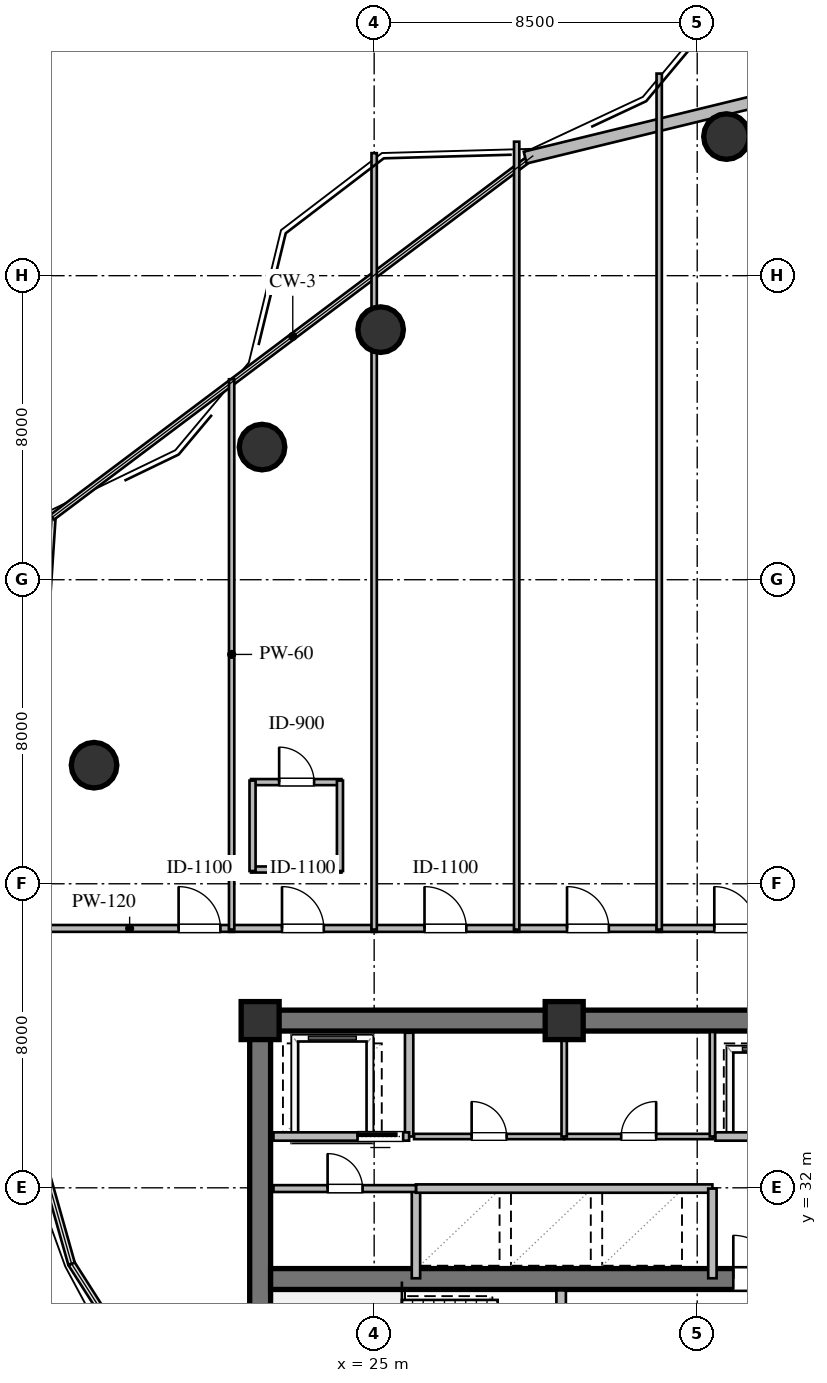
"""IFC4 building model, lengths in metres.
Left out: names, types, materials, properties, quantities, classifications, styles, units other than length and angle.
Written with IfcOpenShell. Run it as: python <this file> out.ifc"""

import sys

from ifc_helpers import new_model, si_unit, direction, frame, frame_2d, origin, origin_2d, place, context, subcontext, project, spatial, rectangle, circle, extrude, element, fill, save


model = new_model("IFC4")
c1 = context("Model", 3, precision=1e-05, world=origin(), true_north=direction((0.0, 1.0)))
c2 = subcontext(c1, "Body", "Model", "MODEL_VIEW")
j1 = project(units=[si_unit("LENGTHUNIT", "METRE"), si_unit("PLANEANGLEUNIT", "RADIAN")], contexts=[c1])
p1 = place(None, origin())
s1 = spatial("IfcSite", under=j1, at=p1, CompositionType="ELEMENT")
p2 = place(p1, origin())
s2 = spatial("IfcBuilding", under=s1, at=p2, CompositionType="ELEMENT")
p3 = place(p2, frame((0.0, 0.0, 117.0)))
s3 = spatial("IfcBuildingStorey", under=s2, at=p3, CompositionType="ELEMENT", Elevation=117.0)
p4 = place(p3, frame((21.725, 36.4, 0.0), z_axis=(0.0, 0.0, 1.0), x_axis=(1.0, 0.0, 0.0)))
e1 = element("IfcWall", 1, at=p4, inside=s3, PredefinedType="SHEAR", context=c2, shape_type="SweptSolid", body=[
    extrude(rectangle(XDim=22.55, YDim=0.55, at=frame_2d((11.275, 0.0))), origin(), (0.0, 0.0, 1.0), 3.36),
])
p5 = place(p3, frame((22.0, 23.875, 0.0), z_axis=(0.0, 0.0, 1.0), x_axis=(0.0, 1.0, 0.0)))
e2 = element("IfcWall", 2, at=p5, inside=s3, PredefinedType="SHEAR", context=c2, shape_type="SweptSolid", body=[
    extrude(rectangle(XDim=12.25, YDim=0.55, at=frame_2d((6.125, 0.0))), origin(), (0.0, 0.0, 1.0), 3.36),
])
p6 = place(p3, frame((22.275, 29.6, 0.0), z_axis=(0.0, 0.0, 1.0), x_axis=(1.0, 0.0, 0.0)))
e3 = element("IfcWall", 3, at=p6, inside=s3, PredefinedType="SHEAR", context=c2, shape_type="SweptSolid", body=[
    extrude(rectangle(XDim=21.45, YDim=0.55, at=frame_2d((10.725, 0.0))), origin(), (0.0, 0.0, 1.0), 3.36),
])
p7 = place(p6, frame((12.175, 0.0, 0.0)))
e4 = element("IfcOpeningElement", 4, at=p7, cuts=e3, PredefinedType="OPENING", context=c2, shape_type="SweptSolid", body=[
    extrude(rectangle(XDim=1.15, YDim=2.1, at=frame_2d((0.575, 1.05))), frame((0.0, 0.285, 0.0), z_axis=(0.0, -1.0, 0.0), x_axis=(1.0, 0.0, 0.0)), (0.0, 0.0, 1.0), 0.57),
])
for number, where, z_axis, x_axis in (
    (5, (30.0, 36.4, 0.0), (0.0, 0.0, 1.0), (1.0, 0.0, 0.0)),
    (6, (22.0, 36.4, 0.0), (0.0, 0.0, 1.0), (1.0, 0.0, 0.0)),
):
    element("IfcColumn", number, at=place(p3, frame(where, z_axis=z_axis, x_axis=x_axis)), inside=s3, PredefinedType="COLUMN", context=c2, shape_type="SweptSolid", body=[
        extrude(rectangle(XDim=1.0, YDim=1.0, at=origin_2d()), origin(), (0.0, 0.0, 1.0), 3.6),
    ])
for number, where, z_axis, x_axis in (
    (7, (34.27, 59.66, 0.0), (0.0, 0.0, 1.0), (1.0, 0.0, 0.0)),
    (8, (25.17, 54.58, 0.0), (0.0, 0.0, 1.0), (1.0, 0.0, 0.0)),
    (9, (22.05, 51.49, 0.0), (0.0, 0.0, 1.0), (1.0, 0.0, 0.0)),
    (10, (17.63, 43.12, 0.0), (0.0, 0.0, 1.0), (1.0, 0.0, 0.0)),
):
    element("IfcColumn", number, at=place(p3, frame(where, z_axis=z_axis, x_axis=x_axis)), inside=s3, PredefinedType="COLUMN", context=c2, shape_type="SweptSolid", body=[
        extrude(circle(Radius=0.6, at=origin_2d()), origin(), (0.0, 0.0, 1.0), 3.6),
    ])
p8 = place(p3, frame((28.974, 59.107, 0.0), z_axis=(0.0, 0.0, 1.0), x_axis=(0.971593971582, 0.236654081699, 0.0)))
e11 = element("IfcWall", 11, at=p8, inside=s3, PredefinedType="STANDARD", context=c2, shape_type="SweptSolid", body=[
    extrude(rectangle(XDim=16.763, YDim=0.32, at=frame_2d((8.381, 0.0))), origin(), (0.0, 0.0, 1.0), 3.36),
])
p9 = place(p8, frame((8.021, 0.0, 1.05)))
e12 = element("IfcOpeningElement", 12, at=p9, cuts=e11, PredefinedType="OPENING", context=c2, shape_type="SweptSolid", body=[
    extrude(rectangle(XDim=1.6, YDim=1.5, at=frame_2d((0.8, 0.75))), frame((0.0, 0.17, 0.0), z_axis=(0.0, -1.0, 0.0), x_axis=(1.0, 0.0, 0.0)), (0.0, 0.0, 1.0), 0.34),
])
p10 = place(p3, frame((29.92, 23.9, 0.0), z_axis=(0.0, 0.0, 1.0), x_axis=(0.0, 1.0, 0.0)))
e13 = element("IfcWall", 13, at=p10, inside=s3, PredefinedType="SOLIDWALL", context=c2, shape_type="SweptSolid", body=[
    extrude(rectangle(XDim=5.4, YDim=0.25, at=frame_2d((2.7, 0.0))), origin(), (0.0, 0.0, 1.0), 2.806),
])
p11 = place(p10, frame((3.421, 0.0, 0.0)))
e14 = element("IfcOpeningElement", 14, at=p11, cuts=e13, PredefinedType="OPENING", context=c2, shape_type="SweptSolid", body=[
    extrude(rectangle(XDim=1.15, YDim=2.1, at=frame_2d((0.575, 1.05))), frame((0.0, 0.135, 0.0), z_axis=(0.0, -1.0, 0.0), x_axis=(1.0, 0.0, 0.0)), (0.0, 0.0, 1.0), 0.27),
])
p12 = place(p3, frame((25.92, 33.35, 0.0), z_axis=(0.0, 0.0, 1.0), x_axis=(0.0, 1.0, 0.0)))
e15 = element("IfcWall", 15, at=p12, inside=s3, PredefinedType="SOLIDWALL", context=c2, shape_type="SweptSolid", body=[
    extrude(rectangle(XDim=2.73, YDim=0.22, at=frame_2d((1.365, 0.0))), origin(), (0.0, 0.0, 1.0), 3.36),
])
p13 = place(p3, frame((22.35, 33.35, 0.0), z_axis=(0.0, 0.0, 1.0), x_axis=(1.0, 0.0, 0.0)))
e16 = element("IfcWall", 16, at=p13, inside=s3, PredefinedType="SOLIDWALL", context=c2, shape_type="SweptSolid", body=[
    extrude(rectangle(XDim=3.57, YDim=0.22, at=frame_2d((1.785, 0.0))), origin(), (0.0, 0.0, 1.0), 3.36),
])
p14 = place(p13, frame((2.213, 0.0, 0.0)))
e17 = element("IfcOpeningElement", 17, at=p14, cuts=e16, PredefinedType="OPENING", context=c2, shape_type="SweptSolid", body=[
    extrude(rectangle(XDim=1.2, YDim=2.1, at=frame_2d((0.6, 1.05))), frame((0.0, 0.12, 0.0), z_axis=(0.0, -1.0, 0.0), x_axis=(1.0, 0.0, 0.0)), (0.0, 0.0, 1.0), 0.24),
])
p15 = place(p3, frame((26.1, 29.62, 0.0), z_axis=(0.0, 0.0, 1.0), x_axis=(0.0, 1.0, 0.0)))
e18 = element("IfcWall", 18, at=p15, inside=s3, PredefinedType="SOLIDWALL", context=c2, shape_type="SweptSolid", body=[
    extrude(rectangle(XDim=2.36, YDim=0.22, at=frame_2d((1.18, 0.0))), origin(), (0.0, 0.0, 1.0), 3.36),
])
p16 = place(p3, frame((26.1, 31.98, 0.0), z_axis=(0.0, 0.0, 1.0), x_axis=(1.0, 0.0, 0.0)))
e19 = element("IfcWall", 19, at=p16, inside=s3, PredefinedType="SOLIDWALL", context=c2, shape_type="SweptSolid", body=[
    extrude(rectangle(XDim=7.8, YDim=0.22, at=frame_2d((3.9, 0.0))), origin(), (0.0, 0.0, 1.0), 3.36),
])
p17 = place(p3, frame((33.9, 29.62, 0.0), z_axis=(0.0, 0.0, 1.0), x_axis=(0.0, 1.0, 0.0)))
e20 = element("IfcWall", 20, at=p17, inside=s3, PredefinedType="SOLIDWALL", context=c2, shape_type="SweptSolid", body=[
    extrude(rectangle(XDim=2.36, YDim=0.22, at=frame_2d((1.18, 0.0))), origin(), (0.0, 0.0, 1.0), 3.36),
])
p18 = place(p3, frame((26.05, 33.35, 0.0), z_axis=(0.0, 0.0, 1.0), x_axis=(1.0, 0.0, 0.0)))
e21 = element("IfcWall", 21, at=p18, inside=s3, PredefinedType="PARTITIONING", context=c2, shape_type="SweptSolid", body=[
    extrude(rectangle(XDim=3.95, YDim=0.14, at=frame_2d((1.975, 0.0))), origin(), (0.0, 0.0, 1.0), 3.36),
])
p19 = place(p18, frame((1.515, 0.0, 0.0)))
e22 = element("IfcOpeningElement", 22, at=p19, cuts=e21, PredefinedType="OPENING", context=c2, shape_type="SweptSolid", body=[
    extrude(rectangle(XDim=0.92, YDim=2.1, at=frame_2d((0.46, 1.05))), frame((0.0, 0.08, 0.0), z_axis=(0.0, -1.0, 0.0), x_axis=(1.0, 0.0, 0.0)), (0.0, 0.0, 1.0), 0.16),
])
p20 = place(p3, frame((30.0, 33.35, 0.0), z_axis=(0.0, 0.0, 1.0), x_axis=(1.0, 0.0, 0.0)))
e23 = element("IfcWall", 23, at=p20, inside=s3, PredefinedType="PARTITIONING", context=c2, shape_type="SweptSolid", body=[
    extrude(rectangle(XDim=3.92, YDim=0.14, at=frame_2d((1.96, 0.0))), origin(), (0.0, 0.0, 1.0), 3.36),
])
p21 = place(p20, frame((1.5, 0.0, 0.0)))
e24 = element("IfcOpeningElement", 24, at=p21, cuts=e23, PredefinedType="OPENING", context=c2, shape_type="SweptSolid", body=[
    extrude(rectangle(XDim=0.92, YDim=2.1, at=frame_2d((0.46, 1.05))), frame((0.0, 0.08, 0.0), z_axis=(0.0, -1.0, 0.0), x_axis=(1.0, 0.0, 0.0)), (0.0, 0.0, 1.0), 0.16),
])
for number, where, z_axis, x_axis in (
    (25, (30.0, 33.35, 0.0), (0.0, 0.0, 1.0), (0.0, 1.0, 0.0)),
    (26, (33.9, 33.35, 0.0), (0.0, 0.0, 1.0), (0.0, 1.0, 0.0)),
):
    element("IfcWall", number, at=place(p3, frame(where, z_axis=z_axis, x_axis=x_axis)), inside=s3, PredefinedType="PARTITIONING", context=c2, shape_type="SweptSolid", body=[
        extrude(rectangle(XDim=2.75, YDim=0.14, at=frame_2d((1.375, 0.0))), origin(), (0.0, 0.0, 1.0), 3.36),
    ])
p22 = place(p3, frame((33.98, 33.35, 0.0), z_axis=(0.0, 0.0, 1.0), x_axis=(1.0, 0.0, 0.0)))
e27 = element("IfcWall", 27, at=p22, inside=s3, PredefinedType="SOLIDWALL", context=c2, shape_type="SweptSolid", body=[
    extrude(rectangle(XDim=7.54, YDim=0.22, at=frame_2d((3.77, 0.0))), origin(), (0.0, 0.0, 1.0), 3.36),
])
p23 = place(p22, frame((1.335, 0.0, 0.0)))
e28 = element("IfcOpeningElement", 28, at=p23, cuts=e27, PredefinedType="OPENING", context=c2, shape_type="SweptSolid", body=[
    extrude(rectangle(XDim=1.1, YDim=2.1, at=frame_2d((0.55, 1.05))), frame((0.0, 0.12, 0.0), z_axis=(0.0, -1.0, 0.0), x_axis=(1.0, 0.0, 0.0)), (0.0, 0.0, 1.0), 0.24),
])
p24 = place(p22, frame((4.879, 0.0, 0.0)))
e29 = element("IfcOpeningElement", 29, at=p24, cuts=e27, PredefinedType="OPENING", context=c2, shape_type="SweptSolid", body=[
    extrude(rectangle(XDim=1.1, YDim=2.1, at=frame_2d((0.55, 1.05))), frame((0.0, 0.12, 0.0), z_axis=(0.0, -1.0, 0.0), x_axis=(1.0, 0.0, 0.0)), (0.0, 0.0, 1.0), 0.24),
])
p25 = place(p3, frame((22.35, 31.98, 0.0), z_axis=(0.0, 0.0, 1.0), x_axis=(1.0, 0.0, 0.0)))
e30 = element("IfcWall", 30, at=p25, inside=s3, PredefinedType="PARTITIONING", context=c2, shape_type="SweptSolid", body=[
    extrude(rectangle(XDim=3.75, YDim=0.18, at=frame_2d((1.875, 0.0))), origin(), (0.0, 0.0, 1.0), 3.36),
])
p26 = place(p25, frame((1.425, 0.0, 0.0)))
e31 = element("IfcOpeningElement", 31, at=p26, cuts=e30, PredefinedType="OPENING", context=c2, shape_type="SweptSolid", body=[
    extrude(rectangle(XDim=0.92, YDim=2.1, at=frame_2d((0.46, 1.05))), frame((0.0, 0.1, 0.0), z_axis=(0.0, -1.0, 0.0), x_axis=(1.0, 0.0, 0.0)), (0.0, 0.0, 1.0), 0.2),
])
p27 = place(p3, frame((21.76, 40.375, 0.0), z_axis=(0.0, 0.0, 1.0), x_axis=(1.0, 0.0, 0.0)))
e32 = element("IfcWall", 32, at=p27, inside=s3, PredefinedType="PLUMBINGWALL", context=c2, shape_type="SweptSolid", body=[
    extrude(rectangle(XDim=2.38, YDim=0.16, at=frame_2d((1.19, 0.0))), origin(), (0.0, 0.0, 1.0), 3.36),
])
p28 = place(p3, frame((21.76, 42.675, 0.0), z_axis=(0.0, 0.0, 1.0), x_axis=(1.0, 0.0, 0.0)))
e33 = element("IfcWall", 33, at=p28, inside=s3, PredefinedType="PLUMBINGWALL", context=c2, shape_type="SweptSolid", body=[
    extrude(rectangle(XDim=2.38, YDim=0.16, at=frame_2d((1.19, 0.0))), origin(), (0.0, 0.0, 1.0), 3.36),
])
p29 = place(p28, frame((0.74, 0.0, 0.0)))
e34 = element("IfcOpeningElement", 34, at=p29, cuts=e33, PredefinedType="OPENING", context=c2, shape_type="SweptSolid", body=[
    extrude(rectangle(XDim=0.92, YDim=2.1, at=frame_2d((0.46, 1.05))), frame((0.0, 0.09, 0.0), z_axis=(0.0, -1.0, 0.0), x_axis=(1.0, 0.0, 0.0)), (0.0, 0.0, 1.0), 0.18),
])
p30 = place(p3, frame((21.8, 40.335, 0.0), z_axis=(0.0, 0.0, 1.0), x_axis=(0.0, 1.0, 0.0)))
e35 = element("IfcWall", 35, at=p30, inside=s3, PredefinedType="PLUMBINGWALL", context=c2, shape_type="SweptSolid", body=[
    extrude(rectangle(XDim=2.38, YDim=0.16, at=frame_2d((1.19, 0.0))), origin(), (0.0, 0.0, 1.0), 2.806),
])
p31 = place(p3, frame((24.1, 40.335, 0.0), z_axis=(0.0, 0.0, 1.0), x_axis=(0.0, 1.0, 0.0)))
e36 = element("IfcWall", 36, at=p31, inside=s3, PredefinedType="PLUMBINGWALL", context=c2, shape_type="SweptSolid", body=[
    extrude(rectangle(XDim=2.38, YDim=0.16, at=frame_2d((1.19, 0.0))), origin(), (0.0, 0.0, 1.0), 3.36),
])
p32 = place(p3, frame((15.817, 38.825, 0.0), z_axis=(0.0, 0.0, 1.0), x_axis=(1.0, 0.0, 0.0)))
e37 = element("IfcWall", 37, at=p32, inside=s3, PredefinedType="PARTITIONING", context=c2, shape_type="SweptSolid", body=[
    extrude(rectangle(XDim=5.498, YDim=0.18, at=frame_2d((2.749, 0.0))), origin(), (0.0, 0.0, 1.0), 3.36),
])
p33 = place(p32, frame((4.038, 0.0, 0.0)))
e38 = element("IfcOpeningElement", 38, at=p33, cuts=e37, PredefinedType="OPENING", context=c2, shape_type="SweptSolid", body=[
    extrude(rectangle(XDim=1.1, YDim=2.1, at=frame_2d((0.55, 1.05))), frame((0.0, 0.1, 0.0), z_axis=(0.0, -1.0, 0.0), x_axis=(1.0, 0.0, 0.0)), (0.0, 0.0, 1.0), 0.2),
])
p34 = place(p3, frame((21.185, 38.825, 0.0), z_axis=(0.0, 0.0, 1.0), x_axis=(1.0, 0.0, 0.0)))
e39 = element("IfcWall", 39, at=p34, inside=s3, PredefinedType="PARTITIONING", context=c2, shape_type="SweptSolid", body=[
    extrude(rectangle(XDim=3.88, YDim=0.18, at=frame_2d((1.94, 0.0))), origin(), (0.0, 0.0, 1.0), 3.36),
])
p35 = place(p34, frame((1.39, 0.0, 0.0)))
e40 = element("IfcOpeningElement", 40, at=p35, cuts=e39, PredefinedType="OPENING", context=c2, shape_type="SweptSolid", body=[
    extrude(rectangle(XDim=1.1, YDim=2.1, at=frame_2d((0.55, 1.05))), frame((0.0, 0.1, 0.0), z_axis=(0.0, -1.0, 0.0), x_axis=(1.0, 0.0, 0.0)), (0.0, 0.0, 1.0), 0.2),
])
p36 = place(p3, frame((24.935, 38.825, 0.0), z_axis=(0.0, 0.0, 1.0), x_axis=(1.0, 0.0, 0.0)))
e41 = element("IfcWall", 41, at=p36, inside=s3, PredefinedType="PARTITIONING", context=c2, shape_type="SweptSolid", body=[
    extrude(rectangle(XDim=3.88, YDim=0.18, at=frame_2d((1.94, 0.0))), origin(), (0.0, 0.0, 1.0), 3.36),
])
p37 = place(p36, frame((1.39, 0.0, 0.0)))
e42 = element("IfcOpeningElement", 42, at=p37, cuts=e41, PredefinedType="OPENING", context=c2, shape_type="SweptSolid", body=[
    extrude(rectangle(XDim=1.1, YDim=2.1, at=frame_2d((0.55, 1.05))), frame((0.0, 0.1, 0.0), z_axis=(0.0, -1.0, 0.0), x_axis=(1.0, 0.0, 0.0)), (0.0, 0.0, 1.0), 0.2),
])
p38 = place(p3, frame((28.685, 38.825, 0.0), z_axis=(0.0, 0.0, 1.0), x_axis=(1.0, 0.0, 0.0)))
e43 = element("IfcWall", 43, at=p38, inside=s3, PredefinedType="PARTITIONING", context=c2, shape_type="SweptSolid", body=[
    extrude(rectangle(XDim=3.88, YDim=0.18, at=frame_2d((1.94, 0.0))), origin(), (0.0, 0.0, 1.0), 3.36),
])
p39 = place(p38, frame((1.39, 0.0, 0.0)))
e44 = element("IfcOpeningElement", 44, at=p39, cuts=e43, PredefinedType="OPENING", context=c2, shape_type="SweptSolid", body=[
    extrude(rectangle(XDim=1.1, YDim=2.1, at=frame_2d((0.55, 1.05))), frame((0.0, 0.1, 0.0), z_axis=(0.0, -1.0, 0.0), x_axis=(1.0, 0.0, 0.0)), (0.0, 0.0, 1.0), 0.2),
])
p40 = place(p3, frame((32.435, 38.825, 0.0), z_axis=(0.0, 0.0, 1.0), x_axis=(1.0, 0.0, 0.0)))
e45 = element("IfcWall", 45, at=p40, inside=s3, PredefinedType="PARTITIONING", context=c2, shape_type="SweptSolid", body=[
    extrude(rectangle(XDim=4.13, YDim=0.18, at=frame_2d((2.065, 0.0))), origin(), (0.0, 0.0, 1.0), 3.36),
])
p41 = place(p40, frame((1.515, 0.0, 0.0)))
e46 = element("IfcOpeningElement", 46, at=p41, cuts=e45, PredefinedType="OPENING", context=c2, shape_type="SweptSolid", body=[
    extrude(rectangle(XDim=1.1, YDim=2.1, at=frame_2d((0.55, 1.05))), frame((0.0, 0.1, 0.0), z_axis=(0.0, -1.0, 0.0), x_axis=(1.0, 0.0, 0.0)), (0.0, 0.0, 1.0), 0.2),
])
p42 = place(p3, frame((21.25, 53.274, 0.0), z_axis=(0.0, 0.0, 1.0), x_axis=(0.0, -1.0, 0.0)))
e47 = element("IfcWall", 47, at=p42, inside=s3, PredefinedType="PARTITIONING", context=c2, shape_type="SweptSolid", body=[
    extrude(rectangle(XDim=14.479, YDim=0.14, at=frame_2d((7.24, 0.0))), origin(), (0.0, 0.0, 1.0), 3.36),
])
p43 = place(p3, frame((25.0, 59.224, 0.0), z_axis=(0.0, 0.0, 1.0), x_axis=(0.0, -1.0, 0.0)))
e48 = element("IfcWall", 48, at=p43, inside=s3, PredefinedType="PARTITIONING", context=c2, shape_type="SweptSolid", body=[
    extrude(rectangle(XDim=20.429, YDim=0.14, at=frame_2d((10.215, 0.0))), origin(), (0.0, 0.0, 1.0), 2.806),
])
p44 = place(p3, frame((28.75, 59.526, 0.0), z_axis=(0.0, 0.0, 1.0), x_axis=(0.0, -1.0, 0.0)))
e49 = element("IfcWall", 49, at=p44, inside=s3, PredefinedType="PARTITIONING", context=c2, shape_type="SweptSolid", body=[
    extrude(rectangle(XDim=20.731, YDim=0.14, at=frame_2d((10.365, 0.0))), origin(), (0.0, 0.0, 1.0), 3.36),
])
p45 = place(p3, frame((32.5, 61.318, 0.0), z_axis=(0.0, 0.0, 1.0), x_axis=(0.0, -1.0, 0.0)))
e50 = element("IfcWall", 50, at=p45, inside=s3, PredefinedType="PARTITIONING", context=c2, shape_type="SweptSolid", body=[
    extrude(rectangle(XDim=22.523, YDim=0.14, at=frame_2d((11.262, 0.0))), origin(), (0.0, 0.0, 1.0), 3.36),
])
p46 = place(p7, origin())
e51 = element("IfcDoor", 51, at=p46, inside=s3, OperationType="SINGLE_SWING_LEFT", PredefinedType="DOOR", context=c2, shape_type="SweptSolid", body=[
    extrude(rectangle(XDim=1.15, YDim=2.1, at=frame_2d((0.575, 1.05))), frame((0.0, 0.025, 0.0), z_axis=(0.0, -1.0, 0.0), x_axis=(1.0, 0.0, 0.0)), (0.0, 0.0, 1.0), 0.05),
])
fill(e4, e51)
p47 = place(p14, origin())
e52 = element("IfcDoor", 52, at=p47, inside=s3, OperationType="SLIDING_TO_LEFT", PredefinedType="DOOR", context=c2, shape_type="SweptSolid", body=[
    extrude(rectangle(XDim=1.2, YDim=2.1, at=frame_2d((0.6, 1.05))), frame((0.0, 0.025, 0.0), z_axis=(0.0, -1.0, 0.0), x_axis=(1.0, 0.0, 0.0)), (0.0, 0.0, 1.0), 0.05),
])
fill(e17, e52)
p48 = place(p19, origin())
e53 = element("IfcDoor", 53, at=p48, inside=s3, OperationType="SINGLE_SWING_LEFT", PredefinedType="DOOR", context=c2, shape_type="SweptSolid", body=[
    extrude(rectangle(XDim=0.92, YDim=2.1, at=frame_2d((0.46, 1.05))), frame((0.0, 0.025, 0.0), z_axis=(0.0, -1.0, 0.0), x_axis=(1.0, 0.0, 0.0)), (0.0, 0.0, 1.0), 0.05),
])
fill(e22, e53)
p49 = place(p21, origin())
e54 = element("IfcDoor", 54, at=p49, inside=s3, OperationType="SINGLE_SWING_RIGHT", PredefinedType="DOOR", context=c2, shape_type="SweptSolid", body=[
    extrude(rectangle(XDim=0.92, YDim=2.1, at=frame_2d((0.46, 1.05))), frame((0.0, 0.025, 0.0), z_axis=(0.0, -1.0, 0.0), x_axis=(1.0, 0.0, 0.0)), (0.0, 0.0, 1.0), 0.05),
])
fill(e24, e54)
p50 = place(p26, origin())
e55 = element("IfcDoor", 55, at=p50, inside=s3, OperationType="SINGLE_SWING_LEFT", PredefinedType="DOOR", context=c2, shape_type="SweptSolid", body=[
    extrude(rectangle(XDim=0.92, YDim=2.1, at=frame_2d((0.46, 1.05))), frame((0.0, 0.025, 0.0), z_axis=(0.0, -1.0, 0.0), x_axis=(1.0, 0.0, 0.0)), (0.0, 0.0, 1.0), 0.05),
])
fill(e31, e55)
p51 = place(p29, origin())
e56 = element("IfcDoor", 56, at=p51, inside=s3, OperationType="SINGLE_SWING_LEFT", PredefinedType="DOOR", context=c2, shape_type="SweptSolid", body=[
    extrude(rectangle(XDim=0.92, YDim=2.1, at=frame_2d((0.46, 1.05))), frame((0.0, 0.025, 0.0), z_axis=(0.0, -1.0, 0.0), x_axis=(1.0, 0.0, 0.0)), (0.0, 0.0, 1.0), 0.05),
])
fill(e34, e56)
p52 = place(p33, origin())
e57 = element("IfcDoor", 57, at=p52, inside=s3, OperationType="SINGLE_SWING_LEFT", PredefinedType="DOOR", context=c2, shape_type="SweptSolid", body=[
    extrude(rectangle(XDim=1.1, YDim=2.1, at=frame_2d((0.55, 1.05))), frame((0.0, 0.025, 0.0), z_axis=(0.0, -1.0, 0.0), x_axis=(1.0, 0.0, 0.0)), (0.0, 0.0, 1.0), 0.05),
])
fill(e38, e57)
p53 = place(p35, origin())
e58 = element("IfcDoor", 58, at=p53, inside=s3, OperationType="SINGLE_SWING_LEFT", PredefinedType="DOOR", context=c2, shape_type="SweptSolid", body=[
    extrude(rectangle(XDim=1.1, YDim=2.1, at=frame_2d((0.55, 1.05))), frame((0.0, 0.025, 0.0), z_axis=(0.0, -1.0, 0.0), x_axis=(1.0, 0.0, 0.0)), (0.0, 0.0, 1.0), 0.05),
])
fill(e40, e58)
p54 = place(p37, origin())
e59 = element("IfcDoor", 59, at=p54, inside=s3, OperationType="SINGLE_SWING_LEFT", PredefinedType="DOOR", context=c2, shape_type="SweptSolid", body=[
    extrude(rectangle(XDim=1.1, YDim=2.1, at=frame_2d((0.55, 1.05))), frame((0.0, 0.025, 0.0), z_axis=(0.0, -1.0, 0.0), x_axis=(1.0, 0.0, 0.0)), (0.0, 0.0, 1.0), 0.05),
])
fill(e42, e59)
p55 = place(p39, origin())
e60 = element("IfcDoor", 60, at=p55, inside=s3, OperationType="SINGLE_SWING_LEFT", PredefinedType="DOOR", context=c2, shape_type="SweptSolid", body=[
    extrude(rectangle(XDim=1.1, YDim=2.1, at=frame_2d((0.55, 1.05))), frame((0.0, 0.025, 0.0), z_axis=(0.0, -1.0, 0.0), x_axis=(1.0, 0.0, 0.0)), (0.0, 0.0, 1.0), 0.05),
])
fill(e44, e60)
p56 = place(p41, origin())
e61 = element("IfcDoor", 61, at=p56, inside=s3, OperationType="SINGLE_SWING_LEFT", PredefinedType="DOOR", context=c2, shape_type="SweptSolid", body=[
    extrude(rectangle(XDim=1.1, YDim=2.1, at=frame_2d((0.55, 1.05))), frame((0.0, 0.025, 0.0), z_axis=(0.0, -1.0, 0.0), x_axis=(1.0, 0.0, 0.0)), (0.0, 0.0, 1.0), 0.05),
])
fill(e46, e61)
save(model, sys.argv[1])
